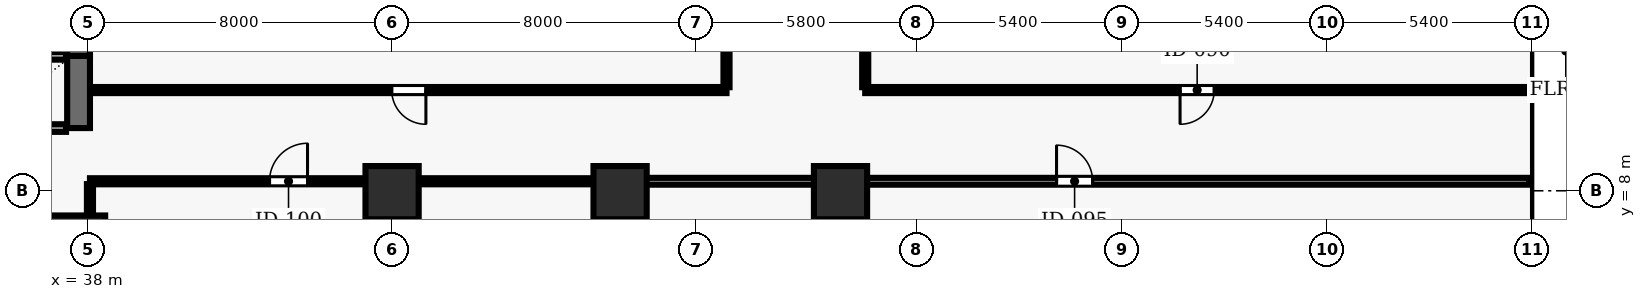
"""IFC4 building model, lengths in metres.
Left out: names, types, materials, properties, quantities, classifications, styles, units other than length and angle.
Written with IfcOpenShell. Run it as: python <this file> out.ifc"""

import sys

from ifc_helpers import new_model, si_unit, direction, frame, frame_2d, origin, origin_2d, place, context, subcontext, project, spatial, rectangle, extrude, element, fill, save


model = new_model("IFC4")
c1 = context("Model", 3, precision=1e-05, world=origin(), true_north=direction((0.0, 1.0)))
c2 = subcontext(c1, "Body", "Model", "MODEL_VIEW")
j1 = project(units=[si_unit("LENGTHUNIT", "METRE"), si_unit("PLANEANGLEUNIT", "RADIAN")], contexts=[c1])
p1 = place(None, origin())
s1 = spatial("IfcSite", under=j1, at=p1, CompositionType="ELEMENT")
p2 = place(p1, origin())
s2 = spatial("IfcBuilding", under=s1, at=p2, CompositionType="ELEMENT")
p3 = place(p2, frame((0.0, 0.0, 5.2)))
s3 = spatial("IfcBuildingStorey", under=s2, at=p3, CompositionType="ELEMENT", Elevation=5.2)
p4 = place(p3, frame((37.65, 6.55, 0.0), z_axis=(0.0, 0.0, 1.0), x_axis=(1.0, 0.0, 0.0)))
e1 = element("IfcColumn", 1, at=p4, inside=s3, PredefinedType="COLUMN", context=c2, shape_type="SweptSolid", body=[
    extrude(rectangle(XDim=1.6, YDim=1.6, at=origin_2d()), origin(), (0.0, 0.0, 1.0), 5.2),
])
for number, where, z_axis, x_axis in (
    (2, (46.0, 7.95, 0.0), (0.0, 0.0, 1.0), (1.0, 0.0, 0.0)),
    (3, (52.0, 7.95, 0.0), (0.0, 0.0, 1.0), (1.0, 0.0, 0.0)),
    (4, (57.8, 7.95, 0.0), (0.0, 0.0, 1.0), (1.0, 0.0, 0.0)),
):
    element("IfcColumn", number, at=place(p3, frame(where, z_axis=z_axis, x_axis=x_axis)), inside=s3, PredefinedType="COLUMN", context=c2, shape_type="SweptSolid", body=[
        extrude(rectangle(XDim=1.4, YDim=1.4, at=origin_2d()), origin(), (0.0, 0.0, 1.0), 5.2),
    ])
p5 = place(p3, frame((37.75, 9.65, 0.0), z_axis=(0.0, 0.0, 1.0), x_axis=(0.0, 1.0, 0.0)))
e5 = element("IfcWall", 5, at=p5, inside=s3, PredefinedType="SHEAR", context=c2, shape_type="SweptSolid", body=[
    extrude(rectangle(XDim=1.9, YDim=0.6, at=frame_2d((0.95, 0.0))), origin(), (0.0, 0.0, 1.0), 4.92),
])
for number, where, z_axis, x_axis in (
    (6, (35.28, 9.65, 0.0), (0.0, 0.0, 1.0), (1.0, 0.0, 0.0)),
    (7, (37.42, 11.55, 0.0), (0.0, 0.0, 1.0), (-1.0, 0.0, 0.0)),
):
    element("IfcWall", number, at=place(p3, frame(where, z_axis=z_axis, x_axis=x_axis)), inside=s3, PredefinedType="SOLIDWALL", context=c2, shape_type="SweptSolid", body=[
        extrude(rectangle(XDim=2.14, YDim=0.2, at=frame_2d((1.07, 0.0))), origin(), (0.0, 0.0, 1.0), 4.92),
    ])
p6 = place(p3, frame((37.75, 11.55, 0.0), z_axis=(0.0, 0.0, 1.0), x_axis=(0.0, 1.0, 0.0)))
e8 = element("IfcWall", 8, at=p6, inside=s3, PredefinedType="SHEAR", context=c2, shape_type="SweptSolid", body=[
    extrude(rectangle(XDim=2.35, YDim=0.6, at=frame_2d((1.175, 0.0))), origin(), (0.0, 0.0, 1.0), 4.92),
])
p7 = place(p3, frame((38.05, 8.25, 0.0), z_axis=(0.0, 0.0, 1.0), x_axis=(1.0, 0.0, 0.0)))
e9 = element("IfcWall", 9, at=p7, inside=s3, PredefinedType="PARTITIONING", context=c2, shape_type="SweptSolid", body=[
    extrude(rectangle(XDim=13.95, YDim=0.16, at=frame_2d((6.975, 0.0))), origin(), (0.0, 0.0, 1.0), 4.065),
])
p8 = place(p7, frame((4.725, 0.0, 0.0)))
e10 = element("IfcOpeningElement", 10, at=p8, cuts=e9, PredefinedType="OPENING", context=c2, shape_type="SweptSolid", body=[
    extrude(rectangle(XDim=1.0, YDim=2.1, at=frame_2d((0.5, 1.05))), frame((0.0, 0.09, 0.0), z_axis=(0.0, -1.0, 0.0), x_axis=(1.0, 0.0, 0.0)), (0.0, 0.0, 1.0), 0.18),
])
p9 = place(p3, frame((52.0, 8.25, 0.0), z_axis=(0.0, 0.0, 1.0), x_axis=(1.0, 0.0, 0.0)))
e11 = element("IfcWall", 11, at=p9, inside=s3, PredefinedType="PARTITIONING", context=c2, shape_type="SweptSolid", body=[
    extrude(rectangle(XDim=23.92, YDim=0.18, at=frame_2d((11.96, 0.0))), origin(), (0.0, 0.0, 1.0), 4.065),
])
p10 = place(p9, frame((11.485, 0.0, 0.0)))
e12 = element("IfcOpeningElement", 12, at=p10, cuts=e11, PredefinedType="OPENING", context=c2, shape_type="SweptSolid", body=[
    extrude(rectangle(XDim=0.95, YDim=2.1, at=frame_2d((0.475, 1.05))), frame((0.0, 0.1, 0.0), z_axis=(0.0, -1.0, 0.0), x_axis=(1.0, 0.0, 0.0)), (0.0, 0.0, 1.0), 0.2),
])
p11 = place(p3, frame((54.8, 10.65, 0.0), z_axis=(0.0, 0.0, 1.0), x_axis=(-1.0, 0.0, 0.0)))
e13 = element("IfcWall", 13, at=p11, inside=s3, PredefinedType="PARTITIONING", context=c2, shape_type="SweptSolid", body=[
    extrude(rectangle(XDim=16.72, YDim=0.16, at=frame_2d((8.36, 0.0))), origin(), (0.0, 0.0, 1.0), 4.451),
])
p12 = place(p11, frame((7.91, 0.0, 0.0)))
e14 = element("IfcOpeningElement", 14, at=p12, cuts=e13, PredefinedType="OPENING", context=c2, shape_type="SweptSolid", body=[
    extrude(rectangle(XDim=0.9, YDim=2.1, at=frame_2d((0.45, 1.05))), frame((0.0, 0.09, 0.0), z_axis=(0.0, -1.0, 0.0), x_axis=(1.0, 0.0, 0.0)), (0.0, 0.0, 1.0), 0.18),
])
p13 = place(p3, frame((75.92, 10.65, 0.0), z_axis=(0.0, 0.0, 1.0), x_axis=(-1.0, 0.0, 0.0)))
e15 = element("IfcWall", 15, at=p13, inside=s3, PredefinedType="PARTITIONING", context=c2, shape_type="SweptSolid", body=[
    extrude(rectangle(XDim=17.47, YDim=0.16, at=frame_2d((8.735, 0.0))), origin(), (0.0, 0.0, 1.0), 4.451),
])
p14 = place(p13, frame((8.285, 0.0, 0.0)))
e16 = element("IfcOpeningElement", 16, at=p14, cuts=e15, PredefinedType="OPENING", context=c2, shape_type="SweptSolid", body=[
    extrude(rectangle(XDim=0.9, YDim=2.1, at=frame_2d((0.45, 1.05))), frame((0.0, 0.09, 0.0), z_axis=(0.0, -1.0, 0.0), x_axis=(1.0, 0.0, 0.0)), (0.0, 0.0, 1.0), 0.18),
])
p15 = place(p3, frame((38.05, 7.05, 0.0), z_axis=(0.0, 0.0, 1.0), x_axis=(0.0, 1.0, 0.0)))
e17 = element("IfcWall", 17, at=p15, inside=s3, PredefinedType="PARTITIONING", context=c2, shape_type="SweptSolid", body=[
    extrude(rectangle(XDim=1.125, YDim=0.16, at=frame_2d((0.562, 0.0))), origin(), (0.0, 0.0, 1.0), 4.065),
])
p16 = place(p3, frame((52.0, 0.155, 0.0), z_axis=(0.0, 0.0, 1.0), x_axis=(0.0, 1.0, 0.0)))
e18 = element("IfcWall", 18, at=p16, inside=s3, PredefinedType="PARTITIONING", context=c2, shape_type="SweptSolid", body=[
    extrude(rectangle(XDim=8.01, YDim=0.18, at=frame_2d((4.005, 0.0))), origin(), (0.0, 0.0, 1.0), 4.065),
])
p17 = place(p3, frame((54.8, 15.115, 0.0), z_axis=(0.0, 0.0, 1.0), x_axis=(0.0, -1.0, 0.0)))
e19 = element("IfcWall", 19, at=p17, inside=s3, PredefinedType="PARTITIONING", context=c2, shape_type="SweptSolid", body=[
    extrude(rectangle(XDim=4.39, YDim=0.16, at=frame_2d((2.195, 0.0))), origin(), (0.0, 0.0, 1.0), 4.92),
])
p18 = place(p3, frame((58.45, 10.725, 0.0), z_axis=(0.0, 0.0, 1.0), x_axis=(0.0, 1.0, 0.0)))
e20 = element("IfcWall", 20, at=p18, inside=s3, PredefinedType="PARTITIONING", context=c2, shape_type="SweptSolid", body=[
    extrude(rectangle(XDim=13.675, YDim=0.16, at=frame_2d((6.837, 0.0))), origin(), (0.0, 0.0, 1.0), 4.92),
])
p19 = place(p14, origin())
e21 = element("IfcDoor", 21, at=p19, inside=s3, OperationType="SINGLE_SWING_RIGHT", PredefinedType="DOOR", context=c2, shape_type="SweptSolid", body=[
    extrude(rectangle(XDim=0.9, YDim=2.1, at=frame_2d((0.45, 1.05))), frame((0.0, 0.025, 0.0), z_axis=(0.0, -1.0, 0.0), x_axis=(1.0, 0.0, 0.0)), (0.0, 0.0, 1.0), 0.05),
])
fill(e16, e21)
p20 = place(p12, origin())
e22 = element("IfcDoor", 22, at=p20, inside=s3, OperationType="SINGLE_SWING_LEFT", PredefinedType="DOOR", context=c2, shape_type="SweptSolid", body=[
    extrude(rectangle(XDim=0.9, YDim=2.1, at=frame_2d((0.45, 1.05))), frame((0.0, 0.025, 0.0), z_axis=(0.0, -1.0, 0.0), x_axis=(1.0, 0.0, 0.0)), (0.0, 0.0, 1.0), 0.05),
])
fill(e14, e22)
p21 = place(p8, origin())
e23 = element("IfcDoor", 23, at=p21, inside=s3, OperationType="SINGLE_SWING_RIGHT", PredefinedType="DOOR", context=c2, shape_type="SweptSolid", body=[
    extrude(rectangle(XDim=1.0, YDim=2.1, at=frame_2d((0.5, 1.05))), frame((0.0, 0.025, 0.0), z_axis=(0.0, -1.0, 0.0), x_axis=(1.0, 0.0, 0.0)), (0.0, 0.0, 1.0), 0.05),
])
fill(e10, e23)
p22 = place(p10, origin())
e24 = element("IfcDoor", 24, at=p22, inside=s3, OperationType="SINGLE_SWING_LEFT", PredefinedType="DOOR", context=c2, shape_type="SweptSolid", body=[
    extrude(rectangle(XDim=0.95, YDim=2.1, at=frame_2d((0.475, 1.05))), frame((0.0, 0.025, 0.0), z_axis=(0.0, -1.0, 0.0), x_axis=(1.0, 0.0, 0.0)), (0.0, 0.0, 1.0), 0.05),
])
fill(e12, e24)
save(model, sys.argv[1])
